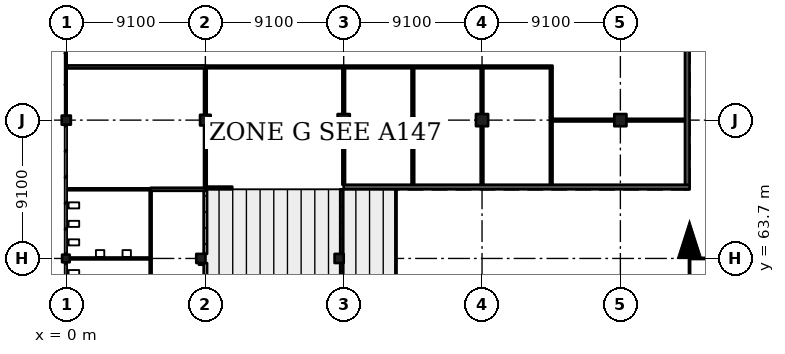
"""IFC4 building model, lengths in metres.
Left out: names, types, materials, properties, quantities, classifications, styles, units other than length and angle.
Written with IfcOpenShell. Run it as: python <this file> out.ifc"""

import sys

from ifc_helpers import new_model, si_unit, direction, frame, frame_2d, origin, origin_2d, place, context, subcontext, project, spatial, rectangle, extrude, element, fill, save


model = new_model("IFC4")
c1 = context("Model", 3, precision=1e-05, world=origin(), true_north=direction((0.0, 1.0)))
c2 = subcontext(c1, "Body", "Model", "MODEL_VIEW")
j1 = project(units=[si_unit("LENGTHUNIT", "METRE"), si_unit("PLANEANGLEUNIT", "RADIAN")], contexts=[c1])
p1 = place(None, origin())
s1 = spatial("IfcSite", under=j1, at=p1, CompositionType="ELEMENT")
p2 = place(p1, origin())
s2 = spatial("IfcBuilding", under=s1, at=p2, CompositionType="ELEMENT")
p3 = place(p2, frame((0.0, 0.0, 15.47)))
s3 = spatial("IfcBuildingStorey", under=s2, at=p3, CompositionType="ELEMENT", Elevation=15.47)
p4 = place(p3, frame((-0.075, 63.7, 0.0), z_axis=(0.0, 0.0, 1.0), x_axis=(1.0, 0.0, 0.0)))
e1 = element("IfcColumn", 1, at=p4, inside=s3, PredefinedType="COLUMN", context=c2, shape_type="SweptSolid", body=[
    extrude(rectangle(XDim=0.5, YDim=0.5, at=origin_2d()), origin(), (0.0, 0.0, 1.0), 4.55),
])
for number, where, z_axis, x_axis in (
    (2, (-0.05, 72.8, 0.0), (0.0, 0.0, 1.0), (1.0, 0.0, 0.0)),
    (3, (8.8, 63.7, 0.0), (0.0, 0.0, 1.0), (1.0, 0.0, 0.0)),
):
    element("IfcColumn", number, at=place(p3, frame(where, z_axis=z_axis, x_axis=x_axis)), inside=s3, PredefinedType="COLUMN", context=c2, shape_type="SweptSolid", body=[
        extrude(rectangle(XDim=0.6, YDim=0.6, at=origin_2d()), origin(), (0.0, 0.0, 1.0), 4.55),
    ])
p5 = place(p3, frame((9.1, 72.8, 0.0), z_axis=(0.0, 0.0, 1.0), x_axis=(1.0, 0.0, 0.0)))
e4 = element("IfcColumn", 4, at=p5, inside=s3, PredefinedType="COLUMN", context=c2, shape_type="SweptSolid", body=[
    extrude(rectangle(XDim=0.7, YDim=0.7, at=origin_2d()), origin(), (0.0, 0.0, 1.0), 4.55),
])
p6 = place(p3, frame((17.9, 63.7, 0.0), z_axis=(0.0, 0.0, 1.0), x_axis=(1.0, 0.0, 0.0)))
e5 = element("IfcColumn", 5, at=p6, inside=s3, PredefinedType="COLUMN", context=c2, shape_type="SweptSolid", body=[
    extrude(rectangle(XDim=0.6, YDim=0.6, at=origin_2d()), origin(), (0.0, 0.0, 1.0), 2.71),
])
for number, where, z_axis, x_axis in (
    (6, (18.2, 72.8, 0.0), (0.0, 0.0, 1.0), (1.0, 0.0, 0.0)),
    (7, (27.3, 72.8, 0.0), (0.0, 0.0, 1.0), (1.0, 0.0, 0.0)),
    (8, (36.4, 72.8, 0.0), (0.0, 0.0, 1.0), (1.0, 0.0, 0.0)),
):
    element("IfcColumn", number, at=place(p3, frame(where, z_axis=z_axis, x_axis=x_axis)), inside=s3, PredefinedType="COLUMN", context=c2, shape_type="SweptSolid", body=[
        extrude(rectangle(XDim=0.8, YDim=0.8, at=origin_2d()), origin(), (0.0, 0.0, 1.0), 4.55),
    ])
for number, where, z_axis, x_axis in (
    (9, (40.8, 68.25, 0.0), (0.0, 0.0, 1.0), (0.0, 1.0, 0.0)),
    (10, (40.95, 68.4, 0.0), (0.0, 0.0, 1.0), (-1.0, 0.0, 0.0)),
):
    element("IfcWall", number, at=place(p3, frame(where, z_axis=z_axis, x_axis=x_axis)), inside=s3, PredefinedType="SHEAR", context=c2, shape_type="SweptSolid", body=[
        extrude(rectangle(XDim=22.75, YDim=0.3, at=frame_2d((11.375, 0.0))), origin(), (0.0, 0.0, 1.0), 4.55),
    ])
p7 = place(p3, frame((0.175, 63.7, 0.0), z_axis=(0.0, 0.0, 1.0), x_axis=(1.0, 0.0, 0.0)))
e11 = element("IfcWall", 11, at=p7, inside=s3, PredefinedType="PARTITIONING", context=c2, shape_type="SweptSolid", body=[
    extrude(rectangle(XDim=5.262, YDim=0.125, at=frame_2d((2.631, 0.0))), origin(), (0.0, 0.0, 1.0), 3.6),
])
p8 = place(p3, frame((5.5, 54.6, 0.0), z_axis=(0.0, 0.0, 1.0), x_axis=(0.0, 1.0, 0.0)))
e12 = element("IfcWall", 12, at=p8, inside=s3, PredefinedType="PARTITIONING", context=c2, shape_type="SweptSolid", body=[
    extrude(rectangle(XDim=13.55, YDim=0.125, at=frame_2d((6.775, 0.0))), origin(), (0.0, 0.0, 1.0), 4.3),
])
p9 = place(p8, frame((4.05, 0.0, 0.0)))
e13 = element("IfcOpeningElement", 13, at=p9, cuts=e12, PredefinedType="OPENING", context=c2, shape_type="SweptSolid", body=[
    extrude(rectangle(XDim=0.9, YDim=2.1, at=frame_2d((0.45, 1.05))), frame((0.0, 0.073, 0.0), z_axis=(0.0, -1.0, 0.0), x_axis=(1.0, 0.0, 0.0)), (0.0, 0.0, 1.0), 0.145),
])
p10 = place(p8, frame((10.85, 0.0, 0.0)))
e14 = element("IfcOpeningElement", 14, at=p10, cuts=e12, PredefinedType="OPENING", context=c2, shape_type="SweptSolid", body=[
    extrude(rectangle(XDim=0.9, YDim=2.1, at=frame_2d((0.45, 1.05))), frame((0.0, 0.073, 0.0), z_axis=(0.0, -1.0, 0.0), x_axis=(1.0, 0.0, 0.0)), (0.0, 0.0, 1.0), 0.145),
])
p11 = place(p3, frame((5.5, 68.25, 0.0), z_axis=(0.0, 0.0, 1.0), x_axis=(-1.0, 0.0, 0.0)))
e15 = element("IfcWall", 15, at=p11, inside=s3, PredefinedType="PARTITIONING", context=c2, shape_type="SweptSolid", body=[
    extrude(rectangle(XDim=5.47, YDim=0.125, at=frame_2d((2.735, 0.0))), origin(), (0.0, 0.0, 1.0), 4.3),
])
p12 = place(p3, frame((8.675, 63.4, 0.0), z_axis=(0.0, 0.0, 1.0), x_axis=(1.0, 0.0, 0.0)))
e16 = element("IfcWall", 16, at=p12, inside=s3, PredefinedType="PARTITIONING", context=c2, shape_type="SweptSolid", body=[
    extrude(rectangle(XDim=0.3, YDim=0.225, at=frame_2d((0.15, 0.0))), origin(), (0.0, 0.0, 1.0), 4.3),
])
p13 = place(p3, frame((9.1, 63.4, 0.0), z_axis=(0.0, 0.0, 1.0), x_axis=(0.0, -1.0, 0.0)))
e17 = element("IfcWall", 17, at=p13, inside=s3, PredefinedType="PARTITIONING", context=c2, shape_type="SweptSolid", body=[
    extrude(rectangle(XDim=8.5, YDim=0.225, at=frame_2d((4.25, 0.0))), origin(), (0.0, 0.0, 1.0), 3.55),
])
p14 = place(p13, frame((3.75, 0.0, 0.0)))
e18 = element("IfcOpeningElement", 18, at=p14, cuts=e17, PredefinedType="OPENING", context=c2, shape_type="SweptSolid", body=[
    extrude(rectangle(XDim=1.0, YDim=2.4, at=frame_2d((0.5, 1.2))), frame((0.0, 0.123, 0.0), z_axis=(0.0, -1.0, 0.0), x_axis=(1.0, 0.0, 0.0)), (0.0, 0.0, 1.0), 0.245),
])
p15 = place(p3, frame((9.1, 68.15, 0.0), z_axis=(0.0, 0.0, 1.0), x_axis=(0.0, -1.0, 0.0)))
e19 = element("IfcWall", 19, at=p15, inside=s3, PredefinedType="PARTITIONING", context=c2, shape_type="SweptSolid", body=[
    extrude(rectangle(XDim=4.15, YDim=0.225, at=frame_2d((2.075, 0.0))), origin(), (0.0, 0.0, 1.0), 3.55),
])
p16 = place(p3, frame((9.1, 68.25, 0.0), z_axis=(0.0, 0.0, 1.0), x_axis=(-1.0, 0.0, 0.0)))
e20 = element("IfcWall", 20, at=p16, inside=s3, PredefinedType="PARTITIONING", context=c2, shape_type="SweptSolid", body=[
    extrude(rectangle(XDim=3.6, YDim=0.2, at=frame_2d((1.8, 0.0))), origin(), (0.0, 0.0, 1.0), 4.3),
])
p17 = place(p16, frame((0.55, 0.0, 0.0)))
e21 = element("IfcOpeningElement", 21, at=p17, cuts=e20, PredefinedType="OPENING", context=c2, shape_type="SweptSolid", body=[
    extrude(rectangle(XDim=2.4, YDim=2.4, at=frame_2d((1.2, 1.2))), frame((0.0, 0.11, 0.0), z_axis=(0.0, -1.0, 0.0), x_axis=(1.0, 0.0, 0.0)), (0.0, 0.0, 1.0), 0.22),
])
p18 = place(p3, frame((9.1, 68.35, 0.0), z_axis=(0.0, 0.0, 1.0), x_axis=(0.0, 1.0, 0.0)))
e22 = element("IfcWall", 22, at=p18, inside=s3, PredefinedType="PARTITIONING", context=c2, shape_type="SweptSolid", body=[
    extrude(rectangle(XDim=4.1, YDim=0.175, at=frame_2d((2.05, 0.0))), origin(), (0.0, 0.0, 1.0), 3.55),
])
p19 = place(p3, frame((9.1, 73.15, 0.0), z_axis=(0.0, 0.0, 1.0), x_axis=(0.0, 1.0, 0.0)))
e23 = element("IfcWall", 23, at=p19, inside=s3, PredefinedType="PARTITIONING", context=c2, shape_type="SweptSolid", body=[
    extrude(rectangle(XDim=3.05, YDim=0.175, at=frame_2d((1.525, 0.0))), origin(), (0.0, 0.0, 1.0), 3.55),
])
p20 = place(p3, frame((9.1, 76.3, 0.0), z_axis=(0.0, 0.0, 1.0), x_axis=(-1.0, 0.0, 0.0)))
e24 = element("IfcWall", 24, at=p20, inside=s3, PredefinedType="PARTITIONING", context=c2, shape_type="SweptSolid", body=[
    extrude(rectangle(XDim=9.07, YDim=0.2, at=frame_2d((4.535, 0.0))), origin(), (0.0, 0.0, 1.0), 4.3),
])
p21 = place(p20, frame((1.05, 0.0, 0.0)))
e25 = element("IfcOpeningElement", 25, at=p21, cuts=e24, PredefinedType="OPENING", context=c2, shape_type="SweptSolid", body=[
    extrude(rectangle(XDim=2.4, YDim=2.4, at=frame_2d((1.2, 1.2))), frame((0.0, 0.11, 0.0), z_axis=(0.0, -1.0, 0.0), x_axis=(1.0, 0.0, 0.0)), (0.0, 0.0, 1.0), 0.22),
])
p22 = place(p20, frame((5.65, 0.0, 0.0)))
e26 = element("IfcOpeningElement", 26, at=p22, cuts=e24, PredefinedType="OPENING", context=c2, shape_type="SweptSolid", body=[
    extrude(rectangle(XDim=2.4, YDim=2.4, at=frame_2d((1.2, 1.2))), frame((0.0, 0.11, 0.0), z_axis=(0.0, -1.0, 0.0), x_axis=(1.0, 0.0, 0.0)), (0.0, 0.0, 1.0), 0.22),
])
p23 = place(p3, frame((9.1, 76.3, 0.0), z_axis=(0.0, 0.0, 1.0), x_axis=(1.0, 0.0, 0.0)))
e27 = element("IfcWall", 27, at=p23, inside=s3, PredefinedType="PARTITIONING", context=c2, shape_type="SweptSolid", body=[
    extrude(rectangle(XDim=22.837, YDim=0.175, at=frame_2d((11.419, 0.0))), origin(), (0.0, 0.0, 1.0), 4.3),
])
p24 = place(p23, frame((3.95, 0.0, 0.0)))
e28 = element("IfcOpeningElement", 28, at=p24, cuts=e27, PredefinedType="OPENING", context=c2, shape_type="SweptSolid", body=[
    extrude(rectangle(XDim=1.1, YDim=2.4, at=frame_2d((0.55, 1.2))), frame((0.0, 0.097, 0.0), z_axis=(0.0, -1.0, 0.0), x_axis=(1.0, 0.0, 0.0)), (0.0, 0.0, 1.0), 0.195),
])
p25 = place(p23, frame((10.85, 0.0, 0.0)))
e29 = element("IfcOpeningElement", 29, at=p25, cuts=e27, PredefinedType="OPENING", context=c2, shape_type="SweptSolid", body=[
    extrude(rectangle(XDim=1.1, YDim=2.4, at=frame_2d((0.55, 1.2))), frame((0.0, 0.097, 0.0), z_axis=(0.0, -1.0, 0.0), x_axis=(1.0, 0.0, 0.0)), (0.0, 0.0, 1.0), 0.195),
])
p26 = place(p23, frame((15.4, 0.0, 0.0)))
e30 = element("IfcOpeningElement", 30, at=p26, cuts=e27, PredefinedType="OPENING", context=c2, shape_type="SweptSolid", body=[
    extrude(rectangle(XDim=1.1, YDim=2.4, at=frame_2d((0.55, 1.2))), frame((0.0, 0.097, 0.0), z_axis=(0.0, -1.0, 0.0), x_axis=(1.0, 0.0, 0.0)), (0.0, 0.0, 1.0), 0.195),
])
p27 = place(p23, frame((19.95, 0.0, 0.0)))
e31 = element("IfcOpeningElement", 31, at=p27, cuts=e27, PredefinedType="OPENING", context=c2, shape_type="SweptSolid", body=[
    extrude(rectangle(XDim=1.1, YDim=2.4, at=frame_2d((0.55, 1.2))), frame((0.0, 0.097, 0.0), z_axis=(0.0, -1.0, 0.0), x_axis=(1.0, 0.0, 0.0)), (0.0, 0.0, 1.0), 0.195),
])
p28 = place(p3, frame((10.87, 68.338, 0.0), z_axis=(0.0, 0.0, 1.0), x_axis=(-1.0, 0.0, 0.0)))
e32 = element("IfcWall", 32, at=p28, inside=s3, PredefinedType="PARTITIONING", context=c2, shape_type="SweptSolid", body=[
    extrude(rectangle(XDim=1.77, YDim=0.175, at=frame_2d((0.885, 0.0))), origin(), (0.0, 0.0, 1.0), 4.3),
])
p29 = place(p3, frame((18.2, 72.4, 0.0), z_axis=(0.0, 0.0, 1.0), x_axis=(0.0, -1.0, 0.0)))
e33 = element("IfcWall", 33, at=p29, inside=s3, PredefinedType="PARTITIONING", context=c2, shape_type="SweptSolid", body=[
    extrude(rectangle(XDim=3.85, YDim=0.175, at=frame_2d((1.925, 0.0))), origin(), (0.0, 0.0, 1.0), 4.3),
])
p30 = place(p3, frame((18.2, 76.212, 0.0), z_axis=(0.0, 0.0, 1.0), x_axis=(0.0, -1.0, 0.0)))
e34 = element("IfcWall", 34, at=p30, inside=s3, PredefinedType="PARTITIONING", context=c2, shape_type="SweptSolid", body=[
    extrude(rectangle(XDim=3.012, YDim=0.175, at=frame_2d((1.506, 0.0))), origin(), (0.0, 0.0, 1.0), 3.6),
])
p31 = place(p3, frame((22.75, 76.212, 0.0), z_axis=(0.0, 0.0, 1.0), x_axis=(0.0, -1.0, 0.0)))
e35 = element("IfcWall", 35, at=p31, inside=s3, PredefinedType="PARTITIONING", context=c2, shape_type="SweptSolid", body=[
    extrude(rectangle(XDim=3.212, YDim=0.175, at=frame_2d((1.606, 0.0))), origin(), (0.0, 0.0, 1.0), 3.7),
])
p32 = place(p3, frame((27.3, 72.4, 0.0), z_axis=(0.0, 0.0, 1.0), x_axis=(0.0, -1.0, 0.0)))
e36 = element("IfcWall", 36, at=p32, inside=s3, PredefinedType="PARTITIONING", context=c2, shape_type="SweptSolid", body=[
    extrude(rectangle(XDim=3.85, YDim=0.175, at=frame_2d((1.925, 0.0))), origin(), (0.0, 0.0, 1.0), 4.3),
])
p33 = place(p3, frame((27.3, 76.212, 0.0), z_axis=(0.0, 0.0, 1.0), x_axis=(0.0, -1.0, 0.0)))
e37 = element("IfcWall", 37, at=p33, inside=s3, PredefinedType="PARTITIONING", context=c2, shape_type="SweptSolid", body=[
    extrude(rectangle(XDim=3.012, YDim=0.175, at=frame_2d((1.506, 0.0))), origin(), (0.0, 0.0, 1.0), 3.6),
])
p34 = place(p3, frame((31.85, 68.55, 0.0), z_axis=(0.0, 0.0, 1.0), x_axis=(0.0, 1.0, 0.0)))
e38 = element("IfcWall", 38, at=p34, inside=s3, PredefinedType="PARTITIONING", context=c2, shape_type="SweptSolid", body=[
    extrude(rectangle(XDim=4.45, YDim=0.175, at=frame_2d((2.225, 0.0))), origin(), (0.0, 0.0, 1.0), 4.3),
])
p35 = place(p3, frame((31.938, 72.8, 0.0), z_axis=(0.0, 0.0, 1.0), x_axis=(1.0, 0.0, 0.0)))
e39 = element("IfcWall", 39, at=p35, inside=s3, PredefinedType="PARTITIONING", context=c2, shape_type="SweptSolid", body=[
    extrude(rectangle(XDim=4.062, YDim=0.175, at=frame_2d((2.031, 0.0))), origin(), (0.0, 0.0, 1.0), 3.6),
])
p36 = place(p35, frame((1.45, 0.0, 0.0)))
e40 = element("IfcOpeningElement", 40, at=p36, cuts=e39, PredefinedType="OPENING", context=c2, shape_type="SweptSolid", body=[
    extrude(rectangle(XDim=1.1, YDim=2.4, at=frame_2d((0.55, 1.2))), frame((0.0, 0.097, 0.0), z_axis=(0.0, -1.0, 0.0), x_axis=(1.0, 0.0, 0.0)), (0.0, 0.0, 1.0), 0.195),
])
p37 = place(p3, frame((36.8, 72.8, 0.0), z_axis=(0.0, 0.0, 1.0), x_axis=(1.0, 0.0, 0.0)))
e41 = element("IfcWall", 41, at=p37, inside=s3, PredefinedType="PARTITIONING", context=c2, shape_type="SweptSolid", body=[
    extrude(rectangle(XDim=3.85, YDim=0.175, at=frame_2d((1.925, 0.0))), origin(), (0.0, 0.0, 1.0), 4.3),
])
p38 = place(p3, frame((18.07, 68.25, 0.0), z_axis=(0.0, 0.0, 1.0), x_axis=(0.0, -1.0, 0.0)))
e42 = element("IfcWall", 42, at=p38, inside=s3, PredefinedType="PARTITIONING", context=c2, shape_type="SweptSolid", body=[
    extrude(rectangle(XDim=4.25, YDim=0.2, at=frame_2d((2.125, 0.0))), origin(), (0.0, 0.0, 1.0), 2.91),
])
p39 = place(p38, frame((1.125, 0.0, 1.1)))
e43 = element("IfcOpeningElement", 43, at=p39, cuts=e42, PredefinedType="OPENING", context=c2, shape_type="SweptSolid", body=[
    extrude(rectangle(XDim=2.0, YDim=1.3, at=frame_2d((1.0, 0.65))), frame((0.0, 0.11, 0.0), z_axis=(0.0, -1.0, 0.0), x_axis=(1.0, 0.0, 0.0)), (0.0, 0.0, 1.0), 0.22),
])
p40 = place(p3, frame((18.07, 63.4, 0.0), z_axis=(0.0, 0.0, 1.0), x_axis=(0.0, -1.0, 0.0)))
e44 = element("IfcWall", 44, at=p40, inside=s3, PredefinedType="PARTITIONING", context=c2, shape_type="SweptSolid", body=[
    extrude(rectangle(XDim=8.5, YDim=0.2, at=frame_2d((4.25, 0.0))), origin(), (0.0, 0.0, 1.0), 2.71),
])
p41 = place(p40, frame((1.25, 0.0, 1.1)))
e45 = element("IfcOpeningElement", 45, at=p41, cuts=e44, PredefinedType="OPENING", context=c2, shape_type="SweptSolid", body=[
    extrude(rectangle(XDim=6.0, YDim=1.3, at=frame_2d((3.0, 0.65))), frame((0.0, 0.11, 0.0), z_axis=(0.0, -1.0, 0.0), x_axis=(1.0, 0.0, 0.0)), (0.0, 0.0, 1.0), 0.22),
])
p42 = place(p3, frame((22.75, 73.0, 0.0), z_axis=(0.0, 0.0, 1.0), x_axis=(0.0, -1.0, 0.0)))
e46 = element("IfcWall", 46, at=p42, inside=s3, PredefinedType="PARTITIONING", context=c2, shape_type="SweptSolid", body=[
    extrude(rectangle(XDim=4.45, YDim=0.175, at=frame_2d((2.225, 0.0))), origin(), (0.0, 0.0, 1.0), 4.3),
])
p43 = place(p3, frame((31.85, 73.0, 0.0), z_axis=(0.0, 0.0, 1.0), x_axis=(0.0, 1.0, 0.0)))
e47 = element("IfcWall", 47, at=p43, inside=s3, PredefinedType="PARTITIONING", context=c2, shape_type="SweptSolid", body=[
    extrude(rectangle(XDim=3.212, YDim=0.175, at=frame_2d((1.606, 0.0))), origin(), (0.0, 0.0, 1.0), 3.7),
])
p44 = place(p39, origin())
e48 = element("IfcWindow", 48, at=p44, inside=s3, PartitioningType="SINGLE_PANEL", PredefinedType="WINDOW", context=c2, shape_type="SweptSolid", body=[
    extrude(rectangle(XDim=2.0, YDim=1.3, at=frame_2d((1.0, 0.65))), frame((0.0, 0.03, 0.0), z_axis=(0.0, -1.0, 0.0), x_axis=(1.0, 0.0, 0.0)), (0.0, 0.0, 1.0), 0.06),
])
fill(e43, e48)
p45 = place(p24, origin())
e49 = element("IfcDoor", 49, at=p45, inside=s3, OperationType="SINGLE_SWING_LEFT", PredefinedType="DOOR", context=c2, shape_type="SweptSolid", body=[
    extrude(rectangle(XDim=1.1, YDim=2.4, at=frame_2d((0.55, 1.2))), frame((0.0, 0.025, 0.0), z_axis=(0.0, -1.0, 0.0), x_axis=(1.0, 0.0, 0.0)), (0.0, 0.0, 1.0), 0.05),
])
fill(e28, e49)
p46 = place(p25, origin())
e50 = element("IfcDoor", 50, at=p46, inside=s3, OperationType="SINGLE_SWING_RIGHT", PredefinedType="DOOR", context=c2, shape_type="SweptSolid", body=[
    extrude(rectangle(XDim=1.1, YDim=2.4, at=frame_2d((0.55, 1.2))), frame((0.0, 0.025, 0.0), z_axis=(0.0, -1.0, 0.0), x_axis=(1.0, 0.0, 0.0)), (0.0, 0.0, 1.0), 0.05),
])
fill(e29, e50)
p47 = place(p26, origin())
e51 = element("IfcDoor", 51, at=p47, inside=s3, OperationType="SINGLE_SWING_RIGHT", PredefinedType="DOOR", context=c2, shape_type="SweptSolid", body=[
    extrude(rectangle(XDim=1.1, YDim=2.4, at=frame_2d((0.55, 1.2))), frame((0.0, 0.025, 0.0), z_axis=(0.0, -1.0, 0.0), x_axis=(1.0, 0.0, 0.0)), (0.0, 0.0, 1.0), 0.05),
])
fill(e30, e51)
p48 = place(p27, origin())
e52 = element("IfcDoor", 52, at=p48, inside=s3, OperationType="SINGLE_SWING_LEFT", PredefinedType="DOOR", context=c2, shape_type="SweptSolid", body=[
    extrude(rectangle(XDim=1.1, YDim=2.4, at=frame_2d((0.55, 1.2))), frame((0.0, 0.025, 0.0), z_axis=(0.0, -1.0, 0.0), x_axis=(1.0, 0.0, 0.0)), (0.0, 0.0, 1.0), 0.05),
])
fill(e31, e52)
p49 = place(p36, origin())
e53 = element("IfcDoor", 53, at=p49, inside=s3, OperationType="SINGLE_SWING_LEFT", PredefinedType="DOOR", context=c2, shape_type="SweptSolid", body=[
    extrude(rectangle(XDim=1.1, YDim=2.4, at=frame_2d((0.55, 1.2))), frame((0.0, 0.025, 0.0), z_axis=(0.0, -1.0, 0.0), x_axis=(1.0, 0.0, 0.0)), (0.0, 0.0, 1.0), 0.05),
])
fill(e40, e53)
p50 = place(p10, origin())
e54 = element("IfcDoor", 54, at=p50, inside=s3, OperationType="SINGLE_SWING_RIGHT", PredefinedType="DOOR", context=c2, shape_type="SweptSolid", body=[
    extrude(rectangle(XDim=0.9, YDim=2.1, at=frame_2d((0.45, 1.05))), frame((0.0, 0.025, 0.0), z_axis=(0.0, -1.0, 0.0), x_axis=(1.0, 0.0, 0.0)), (0.0, 0.0, 1.0), 0.05),
])
fill(e14, e54)
p51 = place(p21, origin())
e55 = element("IfcDoor", 55, at=p51, inside=s3, OperationType="DOUBLE_DOOR_SINGLE_SWING", PredefinedType="DOOR", context=c2, shape_type="SweptSolid", body=[
    extrude(rectangle(XDim=2.4, YDim=2.4, at=frame_2d((1.2, 1.2))), frame((0.0, 0.025, 0.0), z_axis=(0.0, -1.0, 0.0), x_axis=(1.0, 0.0, 0.0)), (0.0, 0.0, 1.0), 0.05),
])
fill(e25, e55)
p52 = place(p22, origin())
e56 = element("IfcDoor", 56, at=p52, inside=s3, OperationType="DOUBLE_DOOR_SINGLE_SWING", PredefinedType="DOOR", context=c2, shape_type="SweptSolid", body=[
    extrude(rectangle(XDim=2.4, YDim=2.4, at=frame_2d((1.2, 1.2))), frame((0.0, 0.025, 0.0), z_axis=(0.0, -1.0, 0.0), x_axis=(1.0, 0.0, 0.0)), (0.0, 0.0, 1.0), 0.05),
])
fill(e26, e56)
p53 = place(p17, origin())
e57 = element("IfcDoor", 57, at=p53, inside=s3, OperationType="DOUBLE_DOOR_SINGLE_SWING", PredefinedType="DOOR", context=c2, shape_type="SweptSolid", body=[
    extrude(rectangle(XDim=2.4, YDim=2.4, at=frame_2d((1.2, 1.2))), frame((0.0, 0.025, 0.0), z_axis=(0.0, -1.0, 0.0), x_axis=(1.0, 0.0, 0.0)), (0.0, 0.0, 1.0), 0.05),
])
fill(e21, e57)
save(model, sys.argv[1])
